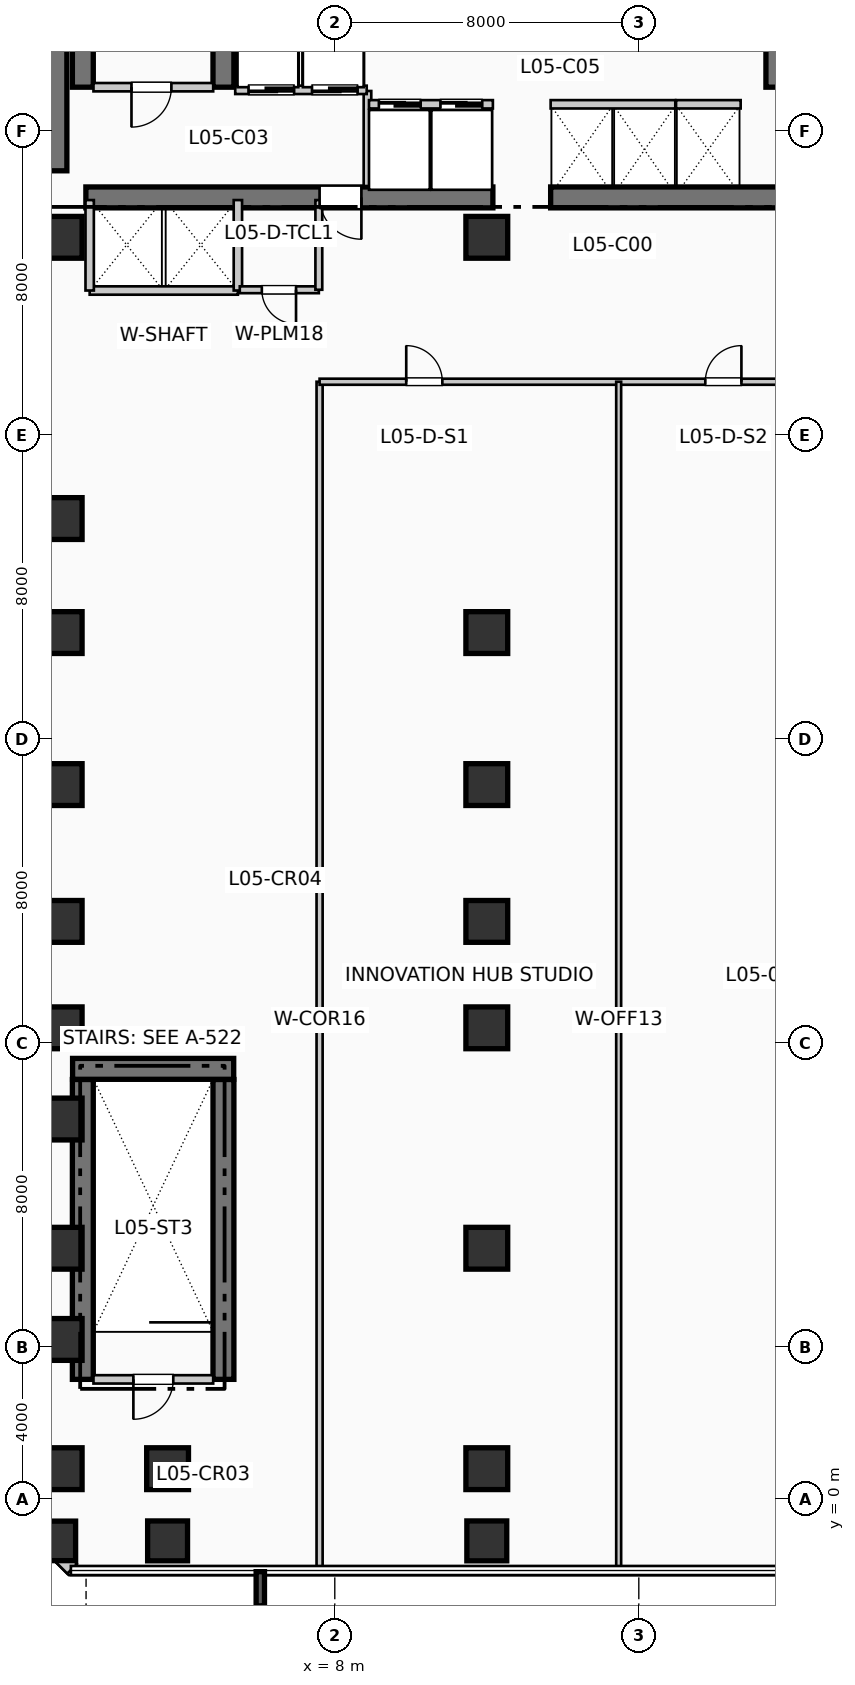
"""IFC4 building model, lengths in metres.
Left out: names, types, materials, properties, quantities, classifications, styles, units other than length and angle.
Written with IfcOpenShell. Run it as: python <this file> out.ifc"""

import sys

from ifc_helpers import new_model, si_unit, direction, frame, frame_2d, origin, origin_2d, place, context, subcontext, project, spatial, rectangle, extrude, element, fill, save


model = new_model("IFC4")
c1 = context("Model", 3, precision=1e-05, world=origin(), true_north=direction((0.0, 1.0)))
c2 = subcontext(c1, "Body", "Model", "MODEL_VIEW")
j1 = project(units=[si_unit("LENGTHUNIT", "METRE"), si_unit("PLANEANGLEUNIT", "RADIAN")], contexts=[c1])
p1 = place(None, origin())
s1 = spatial("IfcSite", under=j1, at=p1, CompositionType="ELEMENT")
p2 = place(p1, origin())
s2 = spatial("IfcBuilding", under=s1, at=p2, CompositionType="ELEMENT")
p3 = place(p2, frame((0.0, 0.0, 25.74)))
s3 = spatial("IfcBuildingStorey", under=s2, at=p3, CompositionType="ELEMENT", Elevation=25.74)
p4 = place(p3, frame((0.5, 34.95, 0.0), z_axis=(0.0, 0.0, 1.0), x_axis=(0.0, 1.0, 0.0)))
e1 = element("IfcWall", 1, at=p4, inside=s3, PredefinedType="SHEAR", context=c2, shape_type="SweptSolid", body=[
    extrude(rectangle(XDim=7.9, YDim=0.9, at=frame_2d((3.95, 0.0))), origin(), (0.0, 0.0, 1.0), 4.62),
])
p5 = place(p3, frame((1.45, 34.25, 0.0), z_axis=(0.0, 0.0, 1.0), x_axis=(1.0, 0.0, 0.0)))
e2 = element("IfcWall", 2, at=p5, inside=s3, PredefinedType="SHEAR", context=c2, shape_type="SweptSolid", body=[
    extrude(rectangle(XDim=10.71, YDim=0.55, at=frame_2d((5.355, 0.0))), origin(), (0.0, 0.0, 1.0), 4.62),
])
p6 = place(p5, frame((7.25, 0.0, 0.0), z_axis=(0.0, 0.0, 1.0), x_axis=(-1.0, 0.0, 0.0)))
e3 = element("IfcOpeningElement", 3, at=p6, cuts=e2, PredefinedType="OPENING", context=c2, shape_type="SweptSolid", body=[
    extrude(rectangle(XDim=1.1, YDim=2.15, at=frame_2d((0.55, 1.075))), frame((0.0, 0.285, 0.0), z_axis=(0.0, -1.0, 0.0), x_axis=(1.0, 0.0, 0.0)), (0.0, 0.0, 1.0), 0.57),
])
p7 = place(p3, frame((13.68, 34.25, 0.0), z_axis=(0.0, 0.0, 1.0), x_axis=(1.0, 0.0, 0.0)))
e4 = element("IfcWall", 4, at=p7, inside=s3, PredefinedType="SHEAR", context=c2, shape_type="SweptSolid", body=[
    extrude(rectangle(XDim=6.12, YDim=0.55, at=frame_2d((3.06, 0.0))), origin(), (0.0, 0.0, 1.0), 4.62),
])
for number, where, z_axis, x_axis in (
    (5, (1.37, 37.15, 0.0), (0.0, 0.0, 1.0), (0.0, 1.0, 0.0)),
    (6, (5.07, 37.15, 0.0), (0.0, 0.0, 1.0), (0.0, 1.0, 0.0)),
    (7, (19.62, 37.15, 0.0), (0.0, 0.0, 1.0), (0.0, 1.0, 0.0)),
    (8, (1.37, 3.15, 0.0), (0.0, 0.0, 1.0), (0.0, 1.0, 0.0)),
    (9, (5.07, 3.15, 0.0), (0.0, 0.0, 1.0), (0.0, 1.0, 0.0)),
):
    element("IfcWall", number, at=place(p3, frame(where, z_axis=z_axis, x_axis=x_axis)), inside=s3, PredefinedType="SHEAR", context=c2, shape_type="SweptSolid", body=[
        extrude(rectangle(XDim=7.89, YDim=0.55, at=frame_2d((3.945, 0.0))), origin(), (0.0, 0.0, 1.0), 4.62),
    ])
p8 = place(p3, frame((1.1, 11.32, 0.0), z_axis=(0.0, 0.0, 1.0), x_axis=(1.0, 0.0, 0.0)))
e10 = element("IfcWall", 10, at=p8, inside=s3, PredefinedType="SHEAR", context=c2, shape_type="SweptSolid", body=[
    extrude(rectangle(XDim=4.24, YDim=0.55, at=frame_2d((2.12, 0.0))), origin(), (0.0, 0.0, 1.0), 4.62),
])
p9 = place(p3, frame((0.8, -1.1, 0.0), z_axis=(0.0, 0.0, 1.0), x_axis=(1.0, 0.0, 0.0)))
e11 = element("IfcColumn", 11, at=p9, inside=s3, PredefinedType="PILASTER", context=c2, shape_type="SweptSolid", body=[
    extrude(rectangle(XDim=0.76, YDim=1.04, at=origin_2d()), origin(), (0.0, 0.0, 1.0), 4.62),
])
for number, where, z_axis, x_axis in (
    (12, (0.8, 0.8, 0.0), (0.0, 0.0, 1.0), (1.0, 0.0, 0.0)),
    (13, (0.8, 4.2, 0.0), (0.0, 0.0, 1.0), (1.0, 0.0, 0.0)),
    (14, (0.8, 6.6, 0.0), (0.0, 0.0, 1.0), (1.0, 0.0, 0.0)),
    (15, (0.8, 10.0, 0.0), (0.0, 0.0, 1.0), (1.0, 0.0, 0.0)),
    (16, (0.8, 12.4, 0.0), (0.0, 0.0, 1.0), (1.0, 0.0, 0.0)),
    (17, (0.8, 15.2, 0.0), (0.0, 0.0, 1.0), (1.0, 0.0, 0.0)),
    (18, (0.8, 18.8, 0.0), (0.0, 0.0, 1.0), (1.0, 0.0, 0.0)),
    (19, (0.8, 22.8, 0.0), (0.0, 0.0, 1.0), (1.0, 0.0, 0.0)),
    (20, (0.8, 25.8, 0.0), (0.0, 0.0, 1.0), (1.0, 0.0, 0.0)),
    (21, (0.8, 33.2, 0.0), (0.0, 0.0, 1.0), (1.0, 0.0, 0.0)),
):
    element("IfcColumn", number, at=place(p3, frame(where, z_axis=z_axis, x_axis=x_axis)), inside=s3, PredefinedType="COLUMN", context=c2, shape_type="SweptSolid", body=[
        extrude(rectangle(XDim=1.1, YDim=1.1, at=origin_2d()), origin(), (0.0, 0.0, 1.0), 4.62),
    ])
p10 = place(p3, frame((3.6, -1.1, 0.0), z_axis=(0.0, 0.0, 1.0), x_axis=(1.0, 0.0, 0.0)))
e22 = element("IfcColumn", 22, at=p10, inside=s3, PredefinedType="COLUMN", context=c2, shape_type="SweptSolid", body=[
    extrude(rectangle(XDim=1.05, YDim=1.05, at=origin_2d()), origin(), (0.0, 0.0, 1.0), 4.62),
])
p11 = place(p3, frame((3.6, 0.8, 0.0), z_axis=(0.0, 0.0, 1.0), x_axis=(1.0, 0.0, 0.0)))
e23 = element("IfcColumn", 23, at=p11, inside=s3, PredefinedType="COLUMN", context=c2, shape_type="SweptSolid", body=[
    extrude(rectangle(XDim=1.1, YDim=1.1, at=origin_2d()), origin(), (0.0, 0.0, 1.0), 4.62),
])
p12 = place(p3, frame((12.0, -1.1, 0.0), z_axis=(0.0, 0.0, 1.0), x_axis=(1.0, 0.0, 0.0)))
e24 = element("IfcColumn", 24, at=p12, inside=s3, PredefinedType="COLUMN", context=c2, shape_type="SweptSolid", body=[
    extrude(rectangle(XDim=1.05, YDim=1.05, at=origin_2d()), origin(), (0.0, 0.0, 1.0), 4.62),
])
for number, where, z_axis, x_axis in (
    (25, (12.0, 0.8, 0.0), (0.0, 0.0, 1.0), (1.0, 0.0, 0.0)),
    (26, (12.0, 6.6, 0.0), (0.0, 0.0, 1.0), (1.0, 0.0, 0.0)),
    (27, (12.0, 12.4, 0.0), (0.0, 0.0, 1.0), (1.0, 0.0, 0.0)),
    (28, (12.0, 15.2, 0.0), (0.0, 0.0, 1.0), (1.0, 0.0, 0.0)),
    (29, (12.0, 18.8, 0.0), (0.0, 0.0, 1.0), (1.0, 0.0, 0.0)),
    (30, (12.0, 22.8, 0.0), (0.0, 0.0, 1.0), (1.0, 0.0, 0.0)),
    (31, (12.0, 33.2, 0.0), (0.0, 0.0, 1.0), (1.0, 0.0, 0.0)),
):
    element("IfcColumn", number, at=place(p3, frame(where, z_axis=z_axis, x_axis=x_axis)), inside=s3, PredefinedType="COLUMN", context=c2, shape_type="SweptSolid", body=[
        extrude(rectangle(XDim=1.1, YDim=1.1, at=origin_2d()), origin(), (0.0, 0.0, 1.0), 4.62),
    ])
p13 = place(p3, frame((-1.834, 1.088, 0.0), z_axis=(0.0, 0.0, 1.0), x_axis=(0.707106781187, -0.707106781187, 0.0)))
e32 = element("IfcWall", 32, at=p13, inside=s3, PredefinedType="SOLIDWALL", context=c2, shape_type="SweptSolid", body=[
    extrude(rectangle(XDim=4.133, YDim=0.36, at=frame_2d((2.066, 0.0))), origin(), (0.0, 0.0, 1.0), 4.37),
])
p14 = place(p3, frame((1.65, 37.15, 0.0), z_axis=(0.0, 0.0, 1.0), x_axis=(1.0, 0.0, 0.0)))
e33 = element("IfcWall", 33, at=p14, inside=s3, PredefinedType="PARTITIONING", context=c2, shape_type="SweptSolid", body=[
    extrude(rectangle(XDim=3.15, YDim=0.22, at=frame_2d((1.575, 0.0))), origin(), (0.0, 0.0, 1.0), 4.37),
])
p15 = place(p14, frame((2.05, 0.0, 0.0), z_axis=(0.0, 0.0, 1.0), x_axis=(-1.0, 0.0, 0.0)))
e34 = element("IfcOpeningElement", 34, at=p15, cuts=e33, PredefinedType="OPENING", context=c2, shape_type="SweptSolid", body=[
    extrude(rectangle(XDim=1.05, YDim=2.15, at=frame_2d((0.525, 1.075))), frame((0.0, 0.12, 0.0), z_axis=(0.0, -1.0, 0.0), x_axis=(1.0, 0.0, 0.0)), (0.0, 0.0, 1.0), 0.24),
])
p16 = place(p3, frame((8.86, 34.55, 0.0), z_axis=(0.0, 0.0, 1.0), x_axis=(0.0, 1.0, 0.0)))
e35 = element("IfcWall", 35, at=p16, inside=s3, PredefinedType="PARTITIONING", context=c2, shape_type="SweptSolid", body=[
    extrude(rectangle(XDim=2.5, YDim=0.2, at=frame_2d((1.25, 0.0))), origin(), (0.0, 0.0, 1.0), 4.37),
])
p17 = place(p3, frame((5.38, 37.08, 0.0), z_axis=(0.0, 0.0, 1.0), x_axis=(1.0, 0.0, 0.0)))
e36 = element("IfcWall", 36, at=p17, inside=s3, PredefinedType="PARTITIONING", context=c2, shape_type="SweptSolid", body=[
    extrude(rectangle(XDim=3.46, YDim=0.22, at=frame_2d((1.73, 0.0))), origin(), (0.0, 0.0, 1.0), 4.37),
])
p18 = place(p17, frame((1.55, 0.0, 0.0), z_axis=(0.0, 0.0, 1.0), x_axis=(-1.0, 0.0, 0.0)))
e37 = element("IfcOpeningElement", 37, at=p18, cuts=e36, PredefinedType="OPENING", context=c2, shape_type="SweptSolid", body=[
    extrude(rectangle(XDim=1.2, YDim=2.2, at=frame_2d((0.6, 1.1))), frame((0.0, 0.12, 0.0), z_axis=(0.0, -1.0, 0.0), x_axis=(1.0, 0.0, 0.0)), (0.0, 0.0, 1.0), 0.24),
])
p19 = place(p17, frame((3.22, 0.0, 0.0), z_axis=(0.0, 0.0, 1.0), x_axis=(-1.0, 0.0, 0.0)))
e38 = element("IfcOpeningElement", 38, at=p19, cuts=e36, PredefinedType="OPENING", context=c2, shape_type="SweptSolid", body=[
    extrude(rectangle(XDim=1.2, YDim=2.2, at=frame_2d((0.6, 1.1))), frame((0.0, 0.12, 0.0), z_axis=(0.0, -1.0, 0.0), x_axis=(1.0, 0.0, 0.0)), (0.0, 0.0, 1.0), 0.24),
])
p20 = place(p3, frame((1.55, 31.8, 0.0), z_axis=(0.0, 0.0, 1.0), x_axis=(1.0, 0.0, 0.0)))
e39 = element("IfcWall", 39, at=p20, inside=s3, PredefinedType="PARTITIONING", context=c2, shape_type="SweptSolid", body=[
    extrude(rectangle(XDim=3.9, YDim=0.22, at=frame_2d((1.95, 0.0))), origin(), (0.0, 0.0, 1.0), 4.37),
])
for number, where, z_axis, x_axis in (
    (40, (1.55, 31.8, 0.0), (0.0, 0.0, 1.0), (0.0, 1.0, 0.0)),
    (41, (5.45, 31.8, 0.0), (0.0, 0.0, 1.0), (0.0, 1.0, 0.0)),
):
    element("IfcWall", number, at=place(p3, frame(where, z_axis=z_axis, x_axis=x_axis)), inside=s3, PredefinedType="PARTITIONING", context=c2, shape_type="SweptSolid", body=[
        extrude(rectangle(XDim=2.38, YDim=0.22, at=frame_2d((1.19, 0.0))), origin(), (0.0, 0.0, 1.0), 4.37),
    ])
p21 = place(p3, frame((5.5, 31.82, 0.0), z_axis=(0.0, 0.0, 1.0), x_axis=(1.0, 0.0, 0.0)))
e42 = element("IfcWall", 42, at=p21, inside=s3, PredefinedType="PLUMBINGWALL", context=c2, shape_type="SweptSolid", body=[
    extrude(rectangle(XDim=2.08, YDim=0.18, at=frame_2d((1.04, 0.0))), origin(), (0.0, 0.0, 1.0), 4.37),
])
p22 = place(p21, frame((1.48, 0.0, 0.0), z_axis=(0.0, 0.0, 1.0), x_axis=(-1.0, 0.0, 0.0)))
e43 = element("IfcOpeningElement", 43, at=p22, cuts=e42, PredefinedType="OPENING", context=c2, shape_type="SweptSolid", body=[
    extrude(rectangle(XDim=0.9, YDim=2.1, at=frame_2d((0.45, 1.05))), frame((0.0, 0.1, 0.0), z_axis=(0.0, -1.0, 0.0), x_axis=(1.0, 0.0, 0.0)), (0.0, 0.0, 1.0), 0.2),
])
p23 = place(p3, frame((7.58, 31.82, 0.0), z_axis=(0.0, 0.0, 1.0), x_axis=(0.0, 1.0, 0.0)))
e44 = element("IfcWall", 44, at=p23, inside=s3, PredefinedType="PLUMBINGWALL", context=c2, shape_type="SweptSolid", body=[
    extrude(rectangle(XDim=2.36, YDim=0.18, at=frame_2d((1.18, 0.0))), origin(), (0.0, 0.0, 1.0), 4.37),
])
p24 = place(p3, frame((8.9, 36.7, 0.0), z_axis=(0.0, 0.0, 1.0), x_axis=(1.0, 0.0, 0.0)))
e45 = element("IfcWall", 45, at=p24, inside=s3, PredefinedType="PARTITIONING", context=c2, shape_type="SweptSolid", body=[
    extrude(rectangle(XDim=3.26, YDim=0.22, at=frame_2d((1.63, 0.0))), origin(), (0.0, 0.0, 1.0), 4.37),
])
p25 = place(p24, frame((0.26, 0.0, 0.0)))
e46 = element("IfcOpeningElement", 46, at=p25, cuts=e45, PredefinedType="OPENING", context=c2, shape_type="SweptSolid", body=[
    extrude(rectangle(XDim=1.1, YDim=2.2, at=frame_2d((0.55, 1.1))), frame((0.0, 0.12, 0.0), z_axis=(0.0, -1.0, 0.0), x_axis=(1.0, 0.0, 0.0)), (0.0, 0.0, 1.0), 0.24),
])
p26 = place(p24, frame((1.88, 0.0, 0.0)))
e47 = element("IfcOpeningElement", 47, at=p26, cuts=e45, PredefinedType="OPENING", context=c2, shape_type="SweptSolid", body=[
    extrude(rectangle(XDim=1.1, YDim=2.2, at=frame_2d((0.55, 1.1))), frame((0.0, 0.12, 0.0), z_axis=(0.0, -1.0, 0.0), x_axis=(1.0, 0.0, 0.0)), (0.0, 0.0, 1.0), 0.24),
])
p27 = place(p3, frame((13.68, 36.7, 0.0), z_axis=(0.0, 0.0, 1.0), x_axis=(1.0, 0.0, 0.0)))
e48 = element("IfcWall", 48, at=p27, inside=s3, PredefinedType="PARTITIONING", context=c2, shape_type="SweptSolid", body=[
    extrude(rectangle(XDim=3.28, YDim=0.22, at=frame_2d((1.64, 0.0))), origin(), (0.0, 0.0, 1.0), 4.37),
])
p28 = place(p3, frame((16.98, 36.7, 0.0), z_axis=(0.0, 0.0, 1.0), x_axis=(1.0, 0.0, 0.0)))
e49 = element("IfcWall", 49, at=p28, inside=s3, PredefinedType="PARTITIONING", context=c2, shape_type="SweptSolid", body=[
    extrude(rectangle(XDim=1.7, YDim=0.22, at=frame_2d((0.85, 0.0))), origin(), (0.0, 0.0, 1.0), 4.37),
])
p29 = place(p3, frame((1.65, 3.15, 0.0), z_axis=(0.0, 0.0, 1.0), x_axis=(1.0, 0.0, 0.0)))
e50 = element("IfcWall", 50, at=p29, inside=s3, PredefinedType="PARTITIONING", context=c2, shape_type="SweptSolid", body=[
    extrude(rectangle(XDim=3.15, YDim=0.22, at=frame_2d((1.575, 0.0))), origin(), (0.0, 0.0, 1.0), 4.37),
])
p30 = place(p29, frame((2.1, 0.0, 0.0), z_axis=(0.0, 0.0, 1.0), x_axis=(-1.0, 0.0, 0.0)))
e51 = element("IfcOpeningElement", 51, at=p30, cuts=e50, PredefinedType="OPENING", context=c2, shape_type="SweptSolid", body=[
    extrude(rectangle(XDim=1.05, YDim=2.15, at=frame_2d((0.525, 1.075))), frame((0.0, 0.12, 0.0), z_axis=(0.0, -1.0, 0.0), x_axis=(1.0, 0.0, 0.0)), (0.0, 0.0, 1.0), 0.24),
])
p31 = place(p3, frame((7.6, -1.81, 0.0), z_axis=(0.0, 0.0, 1.0), x_axis=(0.0, 1.0, 0.0)))
e52 = element("IfcWall", 52, at=p31, inside=s3, PredefinedType="PARTITIONING", context=c2, shape_type="SweptSolid", body=[
    extrude(rectangle(XDim=31.21, YDim=0.16, at=frame_2d((15.605, 0.0))), origin(), (0.0, 0.0, 1.0), 4.37),
])
p32 = place(p3, frame((7.6, 29.4, 0.0), z_axis=(0.0, 0.0, 1.0), x_axis=(1.0, 0.0, 0.0)))
e53 = element("IfcWall", 53, at=p32, inside=s3, PredefinedType="PARTITIONING", context=c2, shape_type="SweptSolid", body=[
    extrude(rectangle(XDim=43.75, YDim=0.16, at=frame_2d((21.875, 0.0))), origin(), (0.0, 0.0, 1.0), 4.025),
])
p33 = place(p32, frame((2.28, 0.0, 0.0)))
e54 = element("IfcOpeningElement", 54, at=p33, cuts=e53, PredefinedType="OPENING", context=c2, shape_type="SweptSolid", body=[
    extrude(rectangle(XDim=0.95, YDim=2.15, at=frame_2d((0.475, 1.075))), frame((0.0, 0.09, 0.0), z_axis=(0.0, -1.0, 0.0), x_axis=(1.0, 0.0, 0.0)), (0.0, 0.0, 1.0), 0.18),
])
p34 = place(p32, frame((10.15, 0.0, 0.0)))
e55 = element("IfcOpeningElement", 55, at=p34, cuts=e53, PredefinedType="OPENING", context=c2, shape_type="SweptSolid", body=[
    extrude(rectangle(XDim=0.95, YDim=2.15, at=frame_2d((0.475, 1.075))), frame((0.0, 0.09, 0.0), z_axis=(0.0, -1.0, 0.0), x_axis=(1.0, 0.0, 0.0)), (0.0, 0.0, 1.0), 0.18),
])
p35 = place(p32, frame((17.85, 0.0, 0.0)))
e56 = element("IfcOpeningElement", 56, at=p35, cuts=e53, PredefinedType="OPENING", context=c2, shape_type="SweptSolid", body=[
    extrude(rectangle(XDim=0.95, YDim=2.15, at=frame_2d((0.475, 1.075))), frame((0.0, 0.09, 0.0), z_axis=(0.0, -1.0, 0.0), x_axis=(1.0, 0.0, 0.0)), (0.0, 0.0, 1.0), 0.18),
])
p36 = place(p32, frame((32.25, 0.0, 0.0)))
e57 = element("IfcOpeningElement", 57, at=p36, cuts=e53, PredefinedType="OPENING", context=c2, shape_type="SweptSolid", body=[
    extrude(rectangle(XDim=0.95, YDim=2.15, at=frame_2d((0.475, 1.075))), frame((0.0, 0.09, 0.0), z_axis=(0.0, -1.0, 0.0), x_axis=(1.0, 0.0, 0.0)), (0.0, 0.0, 1.0), 0.18),
])
p37 = place(p3, frame((15.47, -1.81, 0.0), z_axis=(0.0, 0.0, 1.0), x_axis=(0.0, 1.0, 0.0)))
e58 = element("IfcWall", 58, at=p37, inside=s3, PredefinedType="PARTITIONING", context=c2, shape_type="SweptSolid", body=[
    extrude(rectangle(XDim=31.21, YDim=0.13, at=frame_2d((15.605, 0.0))), origin(), (0.0, 0.0, 1.0), 4.37),
])
p38 = place(p15, origin())
e59 = element("IfcDoor", 59, at=p38, inside=s3, OperationType="SINGLE_SWING_LEFT", PredefinedType="DOOR", context=c2, shape_type="SweptSolid", body=[
    extrude(rectangle(XDim=1.05, YDim=2.15, at=frame_2d((0.525, 1.075))), frame((0.0, 0.025, 0.0), z_axis=(0.0, -1.0, 0.0), x_axis=(1.0, 0.0, 0.0)), (0.0, 0.0, 1.0), 0.05),
])
fill(e34, e59)
p39 = place(p6, origin())
e60 = element("IfcDoor", 60, at=p39, inside=s3, OperationType="SINGLE_SWING_RIGHT", PredefinedType="DOOR", context=c2, shape_type="SweptSolid", body=[
    extrude(rectangle(XDim=1.1, YDim=2.15, at=frame_2d((0.55, 1.075))), frame((0.0, 0.025, 0.0), z_axis=(0.0, -1.0, 0.0), x_axis=(1.0, 0.0, 0.0)), (0.0, 0.0, 1.0), 0.05),
])
fill(e3, e60)
p40 = place(p18, origin())
e61 = element("IfcDoor", 61, at=p40, inside=s3, OperationType="SLIDING_TO_RIGHT", PredefinedType="DOOR", context=c2, shape_type="SweptSolid", body=[
    extrude(rectangle(XDim=1.2, YDim=2.2, at=frame_2d((0.6, 1.1))), frame((0.0, 0.025, 0.0), z_axis=(0.0, -1.0, 0.0), x_axis=(1.0, 0.0, 0.0)), (0.0, 0.0, 1.0), 0.05),
])
fill(e37, e61)
p41 = place(p19, origin())
e62 = element("IfcDoor", 62, at=p41, inside=s3, OperationType="SLIDING_TO_RIGHT", PredefinedType="DOOR", context=c2, shape_type="SweptSolid", body=[
    extrude(rectangle(XDim=1.2, YDim=2.2, at=frame_2d((0.6, 1.1))), frame((0.0, 0.025, 0.0), z_axis=(0.0, -1.0, 0.0), x_axis=(1.0, 0.0, 0.0)), (0.0, 0.0, 1.0), 0.05),
])
fill(e38, e62)
p42 = place(p22, origin())
e63 = element("IfcDoor", 63, at=p42, inside=s3, OperationType="SINGLE_SWING_RIGHT", PredefinedType="DOOR", context=c2, shape_type="SweptSolid", body=[
    extrude(rectangle(XDim=0.9, YDim=2.1, at=frame_2d((0.45, 1.05))), frame((0.0, 0.025, 0.0), z_axis=(0.0, -1.0, 0.0), x_axis=(1.0, 0.0, 0.0)), (0.0, 0.0, 1.0), 0.05),
])
fill(e43, e63)
p43 = place(p25, origin())
e64 = element("IfcDoor", 64, at=p43, inside=s3, OperationType="SLIDING_TO_LEFT", PredefinedType="DOOR", context=c2, shape_type="SweptSolid", body=[
    extrude(rectangle(XDim=1.1, YDim=2.2, at=frame_2d((0.55, 1.1))), frame((0.0, 0.025, 0.0), z_axis=(0.0, -1.0, 0.0), x_axis=(1.0, 0.0, 0.0)), (0.0, 0.0, 1.0), 0.05),
])
fill(e46, e64)
p44 = place(p26, origin())
e65 = element("IfcDoor", 65, at=p44, inside=s3, OperationType="SLIDING_TO_LEFT", PredefinedType="DOOR", context=c2, shape_type="SweptSolid", body=[
    extrude(rectangle(XDim=1.1, YDim=2.2, at=frame_2d((0.55, 1.1))), frame((0.0, 0.025, 0.0), z_axis=(0.0, -1.0, 0.0), x_axis=(1.0, 0.0, 0.0)), (0.0, 0.0, 1.0), 0.05),
])
fill(e47, e65)
p45 = place(p30, origin())
e66 = element("IfcDoor", 66, at=p45, inside=s3, OperationType="SINGLE_SWING_LEFT", PredefinedType="DOOR", context=c2, shape_type="SweptSolid", body=[
    extrude(rectangle(XDim=1.05, YDim=2.15, at=frame_2d((0.525, 1.075))), frame((0.0, 0.025, 0.0), z_axis=(0.0, -1.0, 0.0), x_axis=(1.0, 0.0, 0.0)), (0.0, 0.0, 1.0), 0.05),
])
fill(e51, e66)
p46 = place(p33, origin())
e67 = element("IfcDoor", 67, at=p46, inside=s3, OperationType="SINGLE_SWING_LEFT", PredefinedType="DOOR", context=c2, shape_type="SweptSolid", body=[
    extrude(rectangle(XDim=0.95, YDim=2.15, at=frame_2d((0.475, 1.075))), frame((0.0, 0.025, 0.0), z_axis=(0.0, -1.0, 0.0), x_axis=(1.0, 0.0, 0.0)), (0.0, 0.0, 1.0), 0.05),
])
fill(e54, e67)
p47 = place(p34, origin())
e68 = element("IfcDoor", 68, at=p47, inside=s3, OperationType="SINGLE_SWING_RIGHT", PredefinedType="DOOR", context=c2, shape_type="SweptSolid", body=[
    extrude(rectangle(XDim=0.95, YDim=2.15, at=frame_2d((0.475, 1.075))), frame((0.0, 0.025, 0.0), z_axis=(0.0, -1.0, 0.0), x_axis=(1.0, 0.0, 0.0)), (0.0, 0.0, 1.0), 0.05),
])
fill(e55, e68)
save(model, sys.argv[1])
